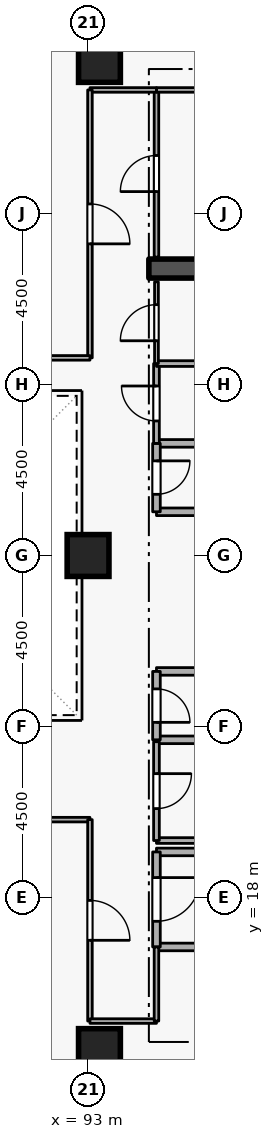
"""IFC4 building model, lengths in metres.
Left out: names, types, materials, properties, quantities, classifications, styles, units other than length and angle.
Written with IfcOpenShell. Run it as: python <this file> out.ifc"""

import sys

from ifc_helpers import new_model, si_unit, direction, frame, frame_2d, origin, origin_2d, place, context, subcontext, project, spatial, rectangle, extrude, element, fill, save


model = new_model("IFC4")
c1 = context("Model", 3, precision=1e-05, world=origin(), true_north=direction((0.0, 1.0)))
c2 = subcontext(c1, "Body", "Model", "MODEL_VIEW")
j1 = project(units=[si_unit("LENGTHUNIT", "METRE"), si_unit("PLANEANGLEUNIT", "RADIAN")], contexts=[c1])
p1 = place(None, origin())
s1 = spatial("IfcSite", under=j1, at=p1, CompositionType="ELEMENT")
p2 = place(p1, origin())
s2 = spatial("IfcBuilding", under=s1, at=p2, CompositionType="ELEMENT")
p3 = place(p2, frame((0.0, 0.0, 182.1)))
s3 = spatial("IfcBuildingStorey", under=s2, at=p3, CompositionType="ELEMENT", Elevation=182.1)
p4 = place(p3, frame((94.6, 34.55, 0.0), z_axis=(0.0, 0.0, 1.0), x_axis=(1.0, 0.0, 0.0)))
e1 = element("IfcWall", 1, at=p4, inside=s3, PredefinedType="SHEAR", context=c2, shape_type="SweptSolid", body=[
    extrude(rectangle(XDim=5.8, YDim=0.5, at=frame_2d((2.9, 0.0))), origin(), (0.0, 0.0, 1.0), 3.6),
])
for number, where, z_axis, x_axis in (
    (2, (93.3, 14.0, 0.0), (0.0, 0.0, 1.0), (1.0, 0.0, 0.0)),
    (3, (93.3, 40.0, 0.0), (0.0, 0.0, 1.0), (1.0, 0.0, 0.0)),
    (4, (93.0, 27.0, 0.0), (0.0, 0.0, 1.0), (1.0, 0.0, 0.0)),
):
    element("IfcColumn", number, at=place(p3, frame(where, z_axis=z_axis, x_axis=x_axis)), inside=s3, PredefinedType="COLUMN", context=c2, shape_type="SweptSolid", body=[
        extrude(rectangle(XDim=1.1, YDim=1.1, at=origin_2d()), origin(), (0.0, 0.0, 1.0), 3.6),
    ])
p5 = place(p3, frame((94.8, 16.7, 0.0), z_axis=(0.0, 0.0, 1.0), x_axis=(1.0, 0.0, 0.0)))
e5 = element("IfcWall", 5, at=p5, inside=s3, PredefinedType="STANDARD", context=c2, shape_type="SweptSolid", body=[
    extrude(rectangle(XDim=5.7, YDim=0.2, at=frame_2d((2.85, 0.0))), origin(), (0.0, 0.0, 1.0), 3.34),
])
p6 = place(p3, frame((97.1, 19.2, 0.0), z_axis=(0.0, 0.0, 1.0), x_axis=(-1.0, 0.0, 0.0)))
e6 = element("IfcWall", 6, at=p6, inside=s3, PredefinedType="STANDARD", context=c2, shape_type="SweptSolid", body=[
    extrude(rectangle(XDim=2.3, YDim=0.2, at=frame_2d((1.15, 0.0))), origin(), (0.0, 0.0, 1.0), 2.545),
])
p7 = place(p3, frame((94.8, 19.2, 0.0), z_axis=(0.0, 0.0, 1.0), x_axis=(0.0, -1.0, 0.0)))
e7 = element("IfcWall", 7, at=p7, inside=s3, PredefinedType="STANDARD", context=c2, shape_type="SweptSolid", body=[
    extrude(rectangle(XDim=2.5, YDim=0.2, at=frame_2d((1.25, 0.0))), origin(), (0.0, 0.0, 1.0), 3.34),
])
p8 = place(p7, frame((0.675, 0.0, 0.0)))
e8 = element("IfcOpeningElement", 8, at=p8, cuts=e7, PredefinedType="OPENING", context=c2, shape_type="SweptSolid", body=[
    extrude(rectangle(XDim=1.15, YDim=2.1, at=frame_2d((0.575, 1.05))), frame((0.0, 0.11, 0.0), z_axis=(0.0, -1.0, 0.0), x_axis=(1.0, 0.0, 0.0)), (0.0, 0.0, 1.0), 0.22),
])
for number, where, z_axis, x_axis in (
    (9, (94.8, 28.15, 0.0), (0.0, 0.0, 1.0), (1.0, 0.0, 0.0)),
    (10, (96.85, 29.95, 0.0), (0.0, 0.0, 1.0), (-1.0, 0.0, 0.0)),
):
    element("IfcWall", number, at=place(p3, frame(where, z_axis=z_axis, x_axis=x_axis)), inside=s3, PredefinedType="STANDARD", context=c2, shape_type="SweptSolid", body=[
        extrude(rectangle(XDim=2.05, YDim=0.2, at=frame_2d((1.025, 0.0))), origin(), (0.0, 0.0, 1.0), 3.34),
    ])
p9 = place(p3, frame((94.8, 29.95, 0.0), z_axis=(0.0, 0.0, 1.0), x_axis=(0.0, -1.0, 0.0)))
e11 = element("IfcWall", 11, at=p9, inside=s3, PredefinedType="STANDARD", context=c2, shape_type="SweptSolid", body=[
    extrude(rectangle(XDim=1.8, YDim=0.2, at=frame_2d((0.9, 0.0))), origin(), (0.0, 0.0, 1.0), 3.34),
])
p10 = place(p9, frame((0.46, 0.0, 0.0)))
e12 = element("IfcOpeningElement", 12, at=p10, cuts=e11, PredefinedType="OPENING", context=c2, shape_type="SweptSolid", body=[
    extrude(rectangle(XDim=0.88, YDim=2.04, at=frame_2d((0.44, 1.02))), frame((0.0, 0.11, 0.0), z_axis=(0.0, -1.0, 0.0), x_axis=(1.0, 0.0, 0.0)), (0.0, 0.0, 1.0), 0.22),
])
for number, where, z_axis, x_axis in (
    (13, (94.8, 22.15, 0.0), (0.0, 0.0, 1.0), (1.0, 0.0, 0.0)),
    (14, (96.85, 23.95, 0.0), (0.0, 0.0, 1.0), (-1.0, 0.0, 0.0)),
):
    element("IfcWall", number, at=place(p3, frame(where, z_axis=z_axis, x_axis=x_axis)), inside=s3, PredefinedType="STANDARD", context=c2, shape_type="SweptSolid", body=[
        extrude(rectangle(XDim=2.05, YDim=0.2, at=frame_2d((1.025, 0.0))), origin(), (0.0, 0.0, 1.0), 3.34),
    ])
p11 = place(p3, frame((94.8, 23.95, 0.0), z_axis=(0.0, 0.0, 1.0), x_axis=(0.0, -1.0, 0.0)))
e15 = element("IfcWall", 15, at=p11, inside=s3, PredefinedType="STANDARD", context=c2, shape_type="SweptSolid", body=[
    extrude(rectangle(XDim=1.8, YDim=0.2, at=frame_2d((0.9, 0.0))), origin(), (0.0, 0.0, 1.0), 3.34),
])
p12 = place(p11, frame((0.46, 0.0, 0.0)))
e16 = element("IfcOpeningElement", 16, at=p12, cuts=e15, PredefinedType="OPENING", context=c2, shape_type="SweptSolid", body=[
    extrude(rectangle(XDim=0.88, YDim=2.04, at=frame_2d((0.44, 1.02))), frame((0.0, 0.11, 0.0), z_axis=(0.0, -1.0, 0.0), x_axis=(1.0, 0.0, 0.0)), (0.0, 0.0, 1.0), 0.22),
])
p13 = place(p3, frame((94.8, 19.5, 0.0), z_axis=(0.0, 0.0, 1.0), x_axis=(1.0, 0.0, 0.0)))
e17 = element("IfcWall", 17, at=p13, inside=s3, PredefinedType="PARTITIONING", context=c2, shape_type="SweptSolid", body=[
    extrude(rectangle(XDim=2.05, YDim=0.15, at=frame_2d((1.025, 0.0))), origin(), (0.0, 0.0, 1.0), 2.545),
])
p14 = place(p3, frame((94.8, 22.1, 0.0), z_axis=(0.0, 0.0, 1.0), x_axis=(0.0, -1.0, 0.0)))
e18 = element("IfcWall", 18, at=p14, inside=s3, PredefinedType="PARTITIONING", context=c2, shape_type="SweptSolid", body=[
    extrude(rectangle(XDim=2.6, YDim=0.15, at=frame_2d((1.3, 0.0))), origin(), (0.0, 0.0, 1.0), 3.34),
])
p15 = place(p14, frame((0.84, 0.0, 0.0)))
e19 = element("IfcOpeningElement", 19, at=p15, cuts=e18, PredefinedType="OPENING", context=c2, shape_type="SweptSolid", body=[
    extrude(rectangle(XDim=0.92, YDim=2.08, at=frame_2d((0.46, 1.04))), frame((0.0, 0.085, 0.0), z_axis=(0.0, -1.0, 0.0), x_axis=(1.0, 0.0, 0.0)), (0.0, 0.0, 1.0), 0.17),
])
p16 = place(p3, frame((94.8, 29.95, 0.0), z_axis=(0.0, 0.0, 1.0), x_axis=(0.0, 1.0, 0.0)))
e20 = element("IfcWall", 20, at=p16, inside=s3, PredefinedType="PARTITIONING", context=c2, shape_type="SweptSolid", body=[
    extrude(rectangle(XDim=2.1, YDim=0.15, at=frame_2d((1.05, 0.0))), origin(), (0.0, 0.0, 1.0), 3.34),
])
p17 = place(p16, frame((0.59, 0.0, 0.0)))
e21 = element("IfcOpeningElement", 21, at=p17, cuts=e20, PredefinedType="OPENING", context=c2, shape_type="SweptSolid", body=[
    extrude(rectangle(XDim=0.92, YDim=2.08, at=frame_2d((0.46, 1.04))), frame((0.0, 0.085, 0.0), z_axis=(0.0, -1.0, 0.0), x_axis=(1.0, 0.0, 0.0)), (0.0, 0.0, 1.0), 0.17),
])
p18 = place(p3, frame((94.8, 32.05, 0.0), z_axis=(0.0, 0.0, 1.0), x_axis=(1.0, 0.0, 0.0)))
e22 = element("IfcWall", 22, at=p18, inside=s3, PredefinedType="PARTITIONING", context=c2, shape_type="SweptSolid", body=[
    extrude(rectangle(XDim=2.05, YDim=0.15, at=frame_2d((1.025, 0.0))), origin(), (0.0, 0.0, 1.0), 3.34),
])
p19 = place(p3, frame((94.8, 32.05, 0.0), z_axis=(0.0, 0.0, 1.0), x_axis=(0.0, 1.0, 0.0)))
e23 = element("IfcWall", 23, at=p19, inside=s3, PredefinedType="PARTITIONING", context=c2, shape_type="SweptSolid", body=[
    extrude(rectangle(XDim=2.15, YDim=0.1, at=frame_2d((1.075, 0.0))), origin(), (0.0, 0.0, 1.0), 3.34),
])
p20 = place(p19, frame((0.6, 0.0, 0.0)))
e24 = element("IfcOpeningElement", 24, at=p20, cuts=e23, PredefinedType="OPENING", context=c2, shape_type="SweptSolid", body=[
    extrude(rectangle(XDim=0.95, YDim=2.1, at=frame_2d((0.475, 1.05))), frame((0.0, 0.06, 0.0), z_axis=(0.0, -1.0, 0.0), x_axis=(1.0, 0.0, 0.0)), (0.0, 0.0, 1.0), 0.12),
])
p21 = place(p3, frame((94.8, 34.85, 0.0), z_axis=(0.0, 0.0, 1.0), x_axis=(0.0, 1.0, 0.0)))
e25 = element("IfcWall", 25, at=p21, inside=s3, PredefinedType="PARTITIONING", context=c2, shape_type="SweptSolid", body=[
    extrude(rectangle(XDim=4.4, YDim=0.12, at=frame_2d((2.2, 0.0))), origin(), (0.0, 0.0, 1.0), 3.34),
])
p22 = place(p21, frame((1.725, 0.0, 0.0)))
e26 = element("IfcOpeningElement", 26, at=p22, cuts=e25, PredefinedType="OPENING", context=c2, shape_type="SweptSolid", body=[
    extrude(rectangle(XDim=0.95, YDim=2.1, at=frame_2d((0.475, 1.05))), frame((0.0, 0.07, 0.0), z_axis=(0.0, -1.0, 0.0), x_axis=(1.0, 0.0, 0.0)), (0.0, 0.0, 1.0), 0.14),
])
p23 = place(p3, frame((94.8, 39.25, 0.0), z_axis=(0.0, 0.0, 1.0), x_axis=(1.0, 0.0, 0.0)))
e27 = element("IfcWall", 27, at=p23, inside=s3, PredefinedType="PARTITIONING", context=c2, shape_type="SweptSolid", body=[
    extrude(rectangle(XDim=5.65, YDim=0.12, at=frame_2d((2.825, 0.0))), origin(), (0.0, 0.0, 1.0), 3.34),
])
p24 = place(p3, frame((88.5, 20.05, 0.0), z_axis=(0.0, 0.0, 1.0), x_axis=(1.0, 0.0, 0.0)))
e28 = element("IfcWall", 28, at=p24, inside=s3, PredefinedType="PARTITIONING", context=c2, shape_type="SweptSolid", body=[
    extrude(rectangle(XDim=4.55, YDim=0.12, at=frame_2d((2.275, 0.0))), origin(), (0.0, 0.0, 1.0), 3.34),
])
p25 = place(p3, frame((93.05, 20.05, 0.0), z_axis=(0.0, 0.0, 1.0), x_axis=(0.0, -1.0, 0.0)))
e29 = element("IfcWall", 29, at=p25, inside=s3, PredefinedType="PARTITIONING", context=c2, shape_type="SweptSolid", body=[
    extrude(rectangle(XDim=5.3, YDim=0.12, at=frame_2d((2.65, 0.0))), origin(), (0.0, 0.0, 1.0), 3.34),
])
p26 = place(p25, frame((2.125, 0.0, 0.0)))
e30 = element("IfcOpeningElement", 30, at=p26, cuts=e29, PredefinedType="OPENING", context=c2, shape_type="SweptSolid", body=[
    extrude(rectangle(XDim=1.05, YDim=2.1, at=frame_2d((0.525, 1.05))), frame((0.0, 0.07, 0.0), z_axis=(0.0, -1.0, 0.0), x_axis=(1.0, 0.0, 0.0)), (0.0, 0.0, 1.0), 0.14),
])
p27 = place(p3, frame((93.05, 14.75, 0.0), z_axis=(0.0, 0.0, 1.0), x_axis=(1.0, 0.0, 0.0)))
e31 = element("IfcWall", 31, at=p27, inside=s3, PredefinedType="PARTITIONING", context=c2, shape_type="SweptSolid", body=[
    extrude(rectangle(XDim=1.75, YDim=0.12, at=frame_2d((0.875, 0.0))), origin(), (0.0, 0.0, 1.0), 3.34),
])
p28 = place(p3, frame((94.8, 14.75, 0.0), z_axis=(0.0, 0.0, 1.0), x_axis=(0.0, 1.0, 0.0)))
e32 = element("IfcWall", 32, at=p28, inside=s3, PredefinedType="PARTITIONING", context=c2, shape_type="SweptSolid", body=[
    extrude(rectangle(XDim=1.95, YDim=0.12, at=frame_2d((0.975, 0.0))), origin(), (0.0, 0.0, 1.0), 3.34),
])
p29 = place(p3, frame((94.8, 39.25, 0.0), z_axis=(0.0, 0.0, 1.0), x_axis=(-1.0, 0.0, 0.0)))
e33 = element("IfcWall", 33, at=p29, inside=s3, PredefinedType="PARTITIONING", context=c2, shape_type="SweptSolid", body=[
    extrude(rectangle(XDim=1.75, YDim=0.12, at=frame_2d((0.875, 0.0))), origin(), (0.0, 0.0, 1.0), 3.34),
])
p30 = place(p3, frame((93.05, 39.25, 0.0), z_axis=(0.0, 0.0, 1.0), x_axis=(0.0, -1.0, 0.0)))
e34 = element("IfcWall", 34, at=p30, inside=s3, PredefinedType="PARTITIONING", context=c2, shape_type="SweptSolid", body=[
    extrude(rectangle(XDim=7.05, YDim=0.12, at=frame_2d((3.525, 0.0))), origin(), (0.0, 0.0, 1.0), 3.34),
])
p31 = place(p30, frame((3.0, 0.0, 0.0)))
e35 = element("IfcOpeningElement", 35, at=p31, cuts=e34, PredefinedType="OPENING", context=c2, shape_type="SweptSolid", body=[
    extrude(rectangle(XDim=1.05, YDim=2.1, at=frame_2d((0.525, 1.05))), frame((0.0, 0.07, 0.0), z_axis=(0.0, -1.0, 0.0), x_axis=(1.0, 0.0, 0.0)), (0.0, 0.0, 1.0), 0.14),
])
p32 = place(p3, frame((93.05, 32.2, 0.0), z_axis=(0.0, 0.0, 1.0), x_axis=(-1.0, 0.0, 0.0)))
e36 = element("IfcWall", 36, at=p32, inside=s3, PredefinedType="PARTITIONING", context=c2, shape_type="SweptSolid", body=[
    extrude(rectangle(XDim=4.55, YDim=0.12, at=frame_2d((2.275, 0.0))), origin(), (0.0, 0.0, 1.0), 3.34),
])
p33 = place(p8, origin())
e37 = element("IfcDoor", 37, at=p33, inside=s3, OperationType="SINGLE_SWING_LEFT", PredefinedType="DOOR", context=c2, shape_type="SweptSolid", body=[
    extrude(rectangle(XDim=1.15, YDim=2.1, at=frame_2d((0.575, 1.05))), frame((0.0, 0.025, 0.0), z_axis=(0.0, -1.0, 0.0), x_axis=(1.0, 0.0, 0.0)), (0.0, 0.0, 1.0), 0.05),
])
fill(e8, e37)
p34 = place(p10, origin())
e38 = element("IfcDoor", 38, at=p34, inside=s3, OperationType="SINGLE_SWING_LEFT", PredefinedType="DOOR", context=c2, shape_type="SweptSolid", body=[
    extrude(rectangle(XDim=0.88, YDim=2.04, at=frame_2d((0.44, 1.02))), frame((0.0, 0.025, 0.0), z_axis=(0.0, -1.0, 0.0), x_axis=(1.0, 0.0, 0.0)), (0.0, 0.0, 1.0), 0.05),
])
fill(e12, e38)
p35 = place(p12, origin())
e39 = element("IfcDoor", 39, at=p35, inside=s3, OperationType="SINGLE_SWING_RIGHT", PredefinedType="DOOR", context=c2, shape_type="SweptSolid", body=[
    extrude(rectangle(XDim=0.88, YDim=2.04, at=frame_2d((0.44, 1.02))), frame((0.0, 0.025, 0.0), z_axis=(0.0, -1.0, 0.0), x_axis=(1.0, 0.0, 0.0)), (0.0, 0.0, 1.0), 0.05),
])
fill(e16, e39)
p36 = place(p15, origin())
e40 = element("IfcDoor", 40, at=p36, inside=s3, OperationType="SINGLE_SWING_LEFT", PredefinedType="DOOR", context=c2, shape_type="SweptSolid", body=[
    extrude(rectangle(XDim=0.92, YDim=2.08, at=frame_2d((0.46, 1.04))), frame((0.0, 0.025, 0.0), z_axis=(0.0, -1.0, 0.0), x_axis=(1.0, 0.0, 0.0)), (0.0, 0.0, 1.0), 0.05),
])
fill(e19, e40)
p37 = place(p17, origin())
e41 = element("IfcDoor", 41, at=p37, inside=s3, OperationType="SINGLE_SWING_RIGHT", PredefinedType="DOOR", context=c2, shape_type="SweptSolid", body=[
    extrude(rectangle(XDim=0.92, YDim=2.08, at=frame_2d((0.46, 1.04))), frame((0.0, 0.025, 0.0), z_axis=(0.0, -1.0, 0.0), x_axis=(1.0, 0.0, 0.0)), (0.0, 0.0, 1.0), 0.05),
])
fill(e21, e41)
p38 = place(p20, origin())
e42 = element("IfcDoor", 42, at=p38, inside=s3, OperationType="SINGLE_SWING_LEFT", PredefinedType="DOOR", context=c2, shape_type="SweptSolid", body=[
    extrude(rectangle(XDim=0.95, YDim=2.1, at=frame_2d((0.475, 1.05))), frame((0.0, 0.025, 0.0), z_axis=(0.0, -1.0, 0.0), x_axis=(1.0, 0.0, 0.0)), (0.0, 0.0, 1.0), 0.05),
])
fill(e24, e42)
p39 = place(p22, origin())
e43 = element("IfcDoor", 43, at=p39, inside=s3, OperationType="SINGLE_SWING_LEFT", PredefinedType="DOOR", context=c2, shape_type="SweptSolid", body=[
    extrude(rectangle(XDim=0.95, YDim=2.1, at=frame_2d((0.475, 1.05))), frame((0.0, 0.025, 0.0), z_axis=(0.0, -1.0, 0.0), x_axis=(1.0, 0.0, 0.0)), (0.0, 0.0, 1.0), 0.05),
])
fill(e26, e43)
p40 = place(p26, origin())
e44 = element("IfcDoor", 44, at=p40, inside=s3, OperationType="SINGLE_SWING_RIGHT", PredefinedType="DOOR", context=c2, shape_type="SweptSolid", body=[
    extrude(rectangle(XDim=1.05, YDim=2.1, at=frame_2d((0.525, 1.05))), frame((0.0, 0.025, 0.0), z_axis=(0.0, -1.0, 0.0), x_axis=(1.0, 0.0, 0.0)), (0.0, 0.0, 1.0), 0.05),
])
fill(e30, e44)
p41 = place(p31, origin())
e45 = element("IfcDoor", 45, at=p41, inside=s3, OperationType="SINGLE_SWING_RIGHT", PredefinedType="DOOR", context=c2, shape_type="SweptSolid", body=[
    extrude(rectangle(XDim=1.05, YDim=2.1, at=frame_2d((0.525, 1.05))), frame((0.0, 0.025, 0.0), z_axis=(0.0, -1.0, 0.0), x_axis=(1.0, 0.0, 0.0)), (0.0, 0.0, 1.0), 0.05),
])
fill(e35, e45)
save(model, sys.argv[1])
